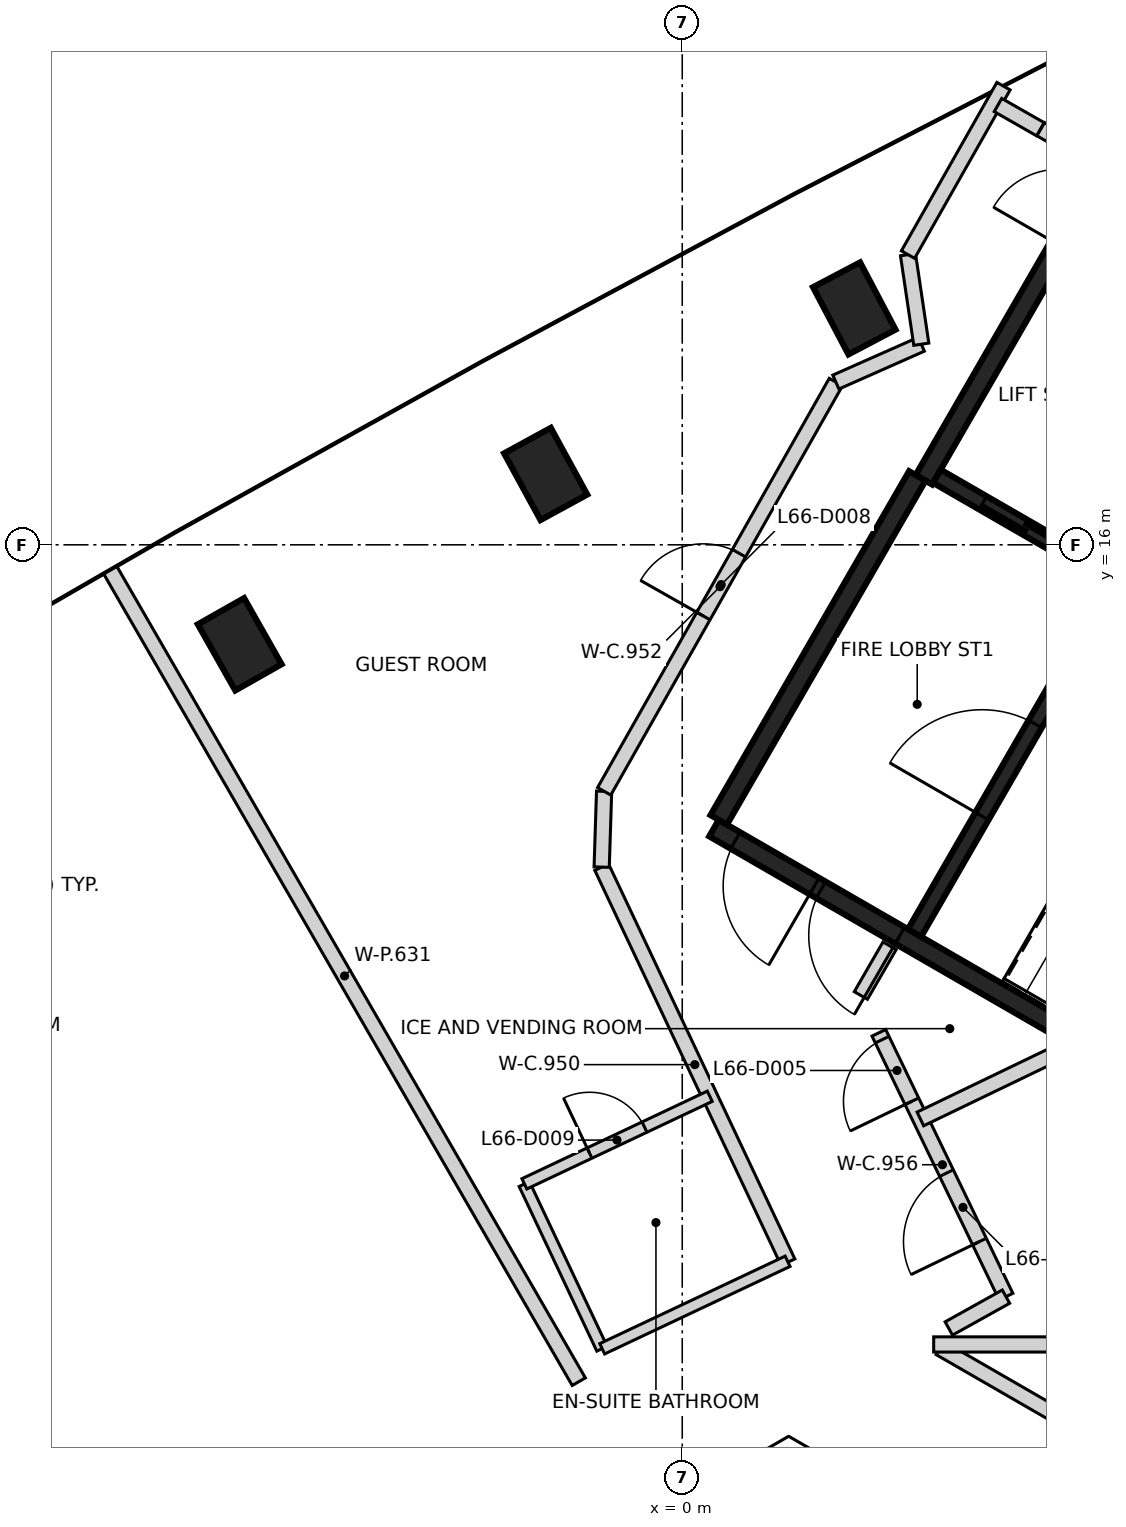
"""IFC4 building model, lengths in metres.
Left out: names, types, materials, properties, quantities, classifications, styles, units other than length and angle.
Written with IfcOpenShell. Run it as: python <this file> out.ifc"""

import sys

from ifc_helpers import new_model, si_unit, direction, frame, frame_2d, origin, origin_2d, place, context, subcontext, project, spatial, rectangle, extrude, element, fill, save


model = new_model("IFC4")
c1 = context("Model", 3, precision=1e-05, world=origin(), true_north=direction((0.0, 1.0)))
c2 = subcontext(c1, "Body", "Model", "MODEL_VIEW")
j1 = project(units=[si_unit("LENGTHUNIT", "METRE"), si_unit("PLANEANGLEUNIT", "RADIAN")], contexts=[c1])
p1 = place(None, origin())
s1 = spatial("IfcSite", under=j1, at=p1, CompositionType="ELEMENT")
p2 = place(p1, origin())
s2 = spatial("IfcBuilding", under=s1, at=p2, CompositionType="ELEMENT")
p3 = place(p2, frame((0.0, 0.0, 262.2)))
s3 = spatial("IfcBuildingStorey", under=s2, at=p3, CompositionType="ELEMENT", Elevation=262.2)
for number, where, z_axis, x_axis in (
    (1, (2.263, 19.11, -0.35), (0.0, 0.0, 1.0), (-0.466, 0.885, 0.0)),
    (2, (-1.797, 16.932, -0.35), (0.0, 0.0, 1.0), (-0.479, 0.878, 0.0)),
    (3, (-5.822, 14.691, -0.35), (0.0, 0.0, 1.0), (-0.493, 0.87, 0.0)),
):
    element("IfcColumn", number, at=place(p3, frame(where, z_axis=z_axis, x_axis=x_axis)), inside=s3, PredefinedType="COLUMN", context=c2, shape_type="SweptSolid", body=[
        extrude(rectangle(XDim=1.0, YDim=0.7, at=origin_2d()), origin(), (0.0, 0.0, 1.0), 3.6),
    ])
p4 = place(p3, frame((10.42, 6.498, 0.0), z_axis=(0.0, 0.0, 1.0), x_axis=(-0.866021906294, 0.500006057782, 0.0)))
e4 = element("IfcWall", 4, at=p4, inside=s3, PredefinedType="SHEAR", context=c2, shape_type="SweptSolid", body=[
    extrude(rectangle(XDim=11.55, YDim=0.25, at=frame_2d((5.775, 0.0))), origin(), (0.0, 0.0, 1.0), 3.25),
])
p5 = place(p4, frame((10.025, 0.0, 0.0)))
e5 = element("IfcOpeningElement", 5, at=p5, cuts=e4, PredefinedType="OPENING", context=c2, shape_type="SweptSolid", body=[
    extrude(rectangle(XDim=1.2, YDim=2.1, at=frame_2d((0.6, 1.05))), frame((0.0, 0.135, 0.0), z_axis=(0.0, -1.0, 0.0), x_axis=(1.0, 0.0, 0.0)), (0.0, 0.0, 1.0), 0.27),
])
p6 = place(p4, frame((8.725, 0.0, 0.0)))
e6 = element("IfcOpeningElement", 6, at=p6, cuts=e4, PredefinedType="OPENING", context=c2, shape_type="SweptSolid", body=[
    extrude(rectangle(XDim=1.2, YDim=2.1, at=frame_2d((0.6, 1.05))), frame((0.0, 0.135, 0.0), z_axis=(0.0, -1.0, 0.0), x_axis=(1.0, 0.0, 0.0)), (0.0, 0.0, 1.0), 0.27),
])
p7 = place(p3, frame((3.179, 16.856, 0.0), z_axis=(0.0, 0.0, 1.0), x_axis=(0.500001955336, 0.866024274868, 0.0)))
e7 = element("IfcWall", 7, at=p7, inside=s3, PredefinedType="SHEAR", context=c2, shape_type="SweptSolid", body=[
    extrude(rectangle(XDim=6.125, YDim=0.25, at=frame_2d((3.062, 0.0))), origin(), (0.0, 0.0, 1.0), 3.25),
])
p8 = place(p7, frame((3.563, 0.0, 0.0)))
e8 = element("IfcOpeningElement", 8, at=p8, cuts=e7, PredefinedType="OPENING", context=c2, shape_type="SweptSolid", body=[
    extrude(rectangle(XDim=1.0, YDim=2.1, at=frame_2d((0.5, 1.05))), frame((0.0, 0.135, 0.0), z_axis=(0.0, -1.0, 0.0), x_axis=(1.0, 0.0, 0.0)), (0.0, 0.0, 1.0), 0.27),
])
p9 = place(p3, frame((0.48, 12.381, 0.0), z_axis=(0.0, 0.0, 1.0), x_axis=(0.49999885962, 0.866026062182, 0.0)))
e9 = element("IfcWall", 9, at=p9, inside=s3, PredefinedType="SHEAR", context=c2, shape_type="SweptSolid", body=[
    extrude(rectangle(XDim=5.225, YDim=0.25, at=frame_2d((2.612, 0.0))), origin(), (0.0, 0.0, 1.0), 3.25),
])
p10 = place(p3, frame((3.057, 10.895, 0.0), z_axis=(0.0, 0.0, 1.0), x_axis=(0.500027839223, 0.866009330205, 0.0)))
e10 = element("IfcWall", 10, at=p10, inside=s3, PredefinedType="SHEAR", context=c2, shape_type="SweptSolid", body=[
    extrude(rectangle(XDim=5.098, YDim=0.2, at=frame_2d((2.549, 0.0))), origin(), (0.0, 0.0, 1.0), 3.25),
])
p11 = place(p10, frame((1.774, 0.0, 0.0)))
e11 = element("IfcOpeningElement", 11, at=p11, cuts=e10, PredefinedType="OPENING", context=c2, shape_type="SweptSolid", body=[
    extrude(rectangle(XDim=1.4, YDim=2.1, at=frame_2d((0.7, 1.05))), frame((0.0, 0.11, 0.0), z_axis=(0.0, -1.0, 0.0), x_axis=(1.0, 0.0, 0.0)), (0.0, 0.0, 1.0), 0.22),
])
p12 = place(p3, frame((5.646, 15.576, 0.0), z_axis=(0.0, 0.0, 1.0), x_axis=(-0.866018407898, 0.500012117035, 0.0)))
e12 = element("IfcWall", 12, at=p12, inside=s3, PredefinedType="SHEAR", context=c2, shape_type="SweptSolid", body=[
    extrude(rectangle(XDim=2.651, YDim=0.2, at=frame_2d((1.325, 0.0))), origin(), (0.0, 0.0, 1.0), 3.25),
])
p13 = place(p12, frame((0.652, 0.0, 0.0)))
e13 = element("IfcOpeningElement", 13, at=p13, cuts=e12, PredefinedType="OPENING", context=c2, shape_type="SweptSolid", body=[
    extrude(rectangle(XDim=1.3, YDim=2.1, at=frame_2d((0.65, 1.05))), frame((0.0, 0.11, 0.0), z_axis=(0.0, -1.0, 0.0), x_axis=(1.0, 0.0, 0.0)), (0.0, 0.0, 1.0), 0.22),
])
p14 = place(p3, frame((-1.06, 11.76, 0.0), z_axis=(0.0, 0.0, 1.0), x_axis=(0.426549824954, -0.904464066081, 0.0)))
e14 = element("IfcWall", 14, at=p14, inside=s3, PredefinedType="PARTITIONING", context=c2, shape_type="SweptSolid", body=[
    extrude(rectangle(XDim=5.747, YDim=0.2, at=frame_2d((2.873, 0.0))), origin(), (0.0, 0.0, 1.0), 3.25),
])
p15 = place(p3, frame((-1.06, 11.76, 0.0), z_axis=(0.0, 0.0, 1.0), x_axis=(0.032059906789, 0.999485949064, 0.0)))
e15 = element("IfcWall", 15, at=p15, inside=s3, PredefinedType="PARTITIONING", context=c2, shape_type="SweptSolid", body=[
    extrude(rectangle(XDim=0.998, YDim=0.2, at=frame_2d((0.499, 0.0))), origin(), (0.0, 0.0, 1.0), 3.25),
])
p16 = place(p3, frame((-1.027, 12.757, 0.0), z_axis=(0.0, 0.0, 1.0), x_axis=(0.492663063759, 0.870220147783, 0.0)))
e16 = element("IfcWall", 16, at=p16, inside=s3, PredefinedType="PARTITIONING", context=c2, shape_type="SweptSolid", body=[
    extrude(rectangle(XDim=6.187, YDim=0.2, at=frame_2d((3.094, 0.0))), origin(), (0.0, 0.0, 1.0), 3.25),
])
p17 = place(p16, frame((2.65, 0.0, 0.0)))
e17 = element("IfcOpeningElement", 17, at=p17, cuts=e16, PredefinedType="OPENING", context=c2, shape_type="SweptSolid", body=[
    extrude(rectangle(XDim=0.95, YDim=2.1, at=frame_2d((0.475, 1.05))), frame((0.0, 0.11, 0.0), z_axis=(0.0, -1.0, 0.0), x_axis=(1.0, 0.0, 0.0)), (0.0, 0.0, 1.0), 0.22),
])
p18 = place(p3, frame((2.021, 18.141, 0.0), z_axis=(0.0, 0.0, 1.0), x_axis=(0.914343087003, 0.404940389748, 0.0)))
e18 = element("IfcWall", 18, at=p18, inside=s3, PredefinedType="PARTITIONING", context=c2, shape_type="SweptSolid", body=[
    extrude(rectangle(XDim=1.229, YDim=0.2, at=frame_2d((0.615, 0.0))), origin(), (0.0, 0.0, 1.0), 3.25),
])
p19 = place(p3, frame((2.35, 10.071, 0.0), z_axis=(0.0, 0.0, 1.0), x_axis=(0.500309905322, 0.865846405916, 0.0)))
e19 = element("IfcWall", 19, at=p19, inside=s3, PredefinedType="PARTITIONING", context=c2, shape_type="SweptSolid", body=[
    extrude(rectangle(XDim=0.755, YDim=0.2, at=frame_2d((0.378, 0.0))), origin(), (0.0, 0.0, 1.0), 3.25),
])
p20 = place(p3, frame((4.26, 6.109, 0.0), z_axis=(0.0, 0.0, 1.0), x_axis=(-0.434189007872, 0.900821794498, 0.0)))
e20 = element("IfcWall", 20, at=p20, inside=s3, PredefinedType="PARTITIONING", context=c2, shape_type="SweptSolid", body=[
    extrude(rectangle(XDim=3.853, YDim=0.2, at=frame_2d((1.926, 0.0))), origin(), (0.0, 0.0, 1.0), 3.25),
])
p21 = place(p20, frame((2.853, 0.0, 0.0)))
e21 = element("IfcOpeningElement", 21, at=p21, cuts=e20, PredefinedType="OPENING", context=c2, shape_type="SweptSolid", body=[
    extrude(rectangle(XDim=0.9, YDim=2.1, at=frame_2d((0.45, 1.05))), frame((0.0, 0.11, 0.0), z_axis=(0.0, -1.0, 0.0), x_axis=(1.0, 0.0, 0.0)), (0.0, 0.0, 1.0), 0.22),
])
p22 = place(p20, frame((0.804, 0.0, 0.0)))
e22 = element("IfcOpeningElement", 22, at=p22, cuts=e20, PredefinedType="OPENING", context=c2, shape_type="SweptSolid", body=[
    extrude(rectangle(XDim=1.0, YDim=2.1, at=frame_2d((0.5, 1.05))), frame((0.0, 0.11, 0.0), z_axis=(0.0, -1.0, 0.0), x_axis=(1.0, 0.0, 0.0)), (0.0, 0.0, 1.0), 0.22),
])
p23 = place(p3, frame((2.97, 19.817, 0.0), z_axis=(0.0, 0.0, 1.0), x_axis=(0.146986994932, -0.989138424752, 0.0)))
e23 = element("IfcWall", 23, at=p23, inside=s3, PredefinedType="PARTITIONING", context=c2, shape_type="SweptSolid", body=[
    extrude(rectangle(XDim=1.191, YDim=0.2, at=frame_2d((0.595, 0.0))), origin(), (0.0, 0.0, 1.0), 2.35),
])
p24 = place(p3, frame((2.97, 19.818, 0.0), z_axis=(0.0, 0.0, 1.0), x_axis=(0.493215654548, 0.86990707441, 0.0)))
e24 = element("IfcWall", 24, at=p24, inside=s3, PredefinedType="PARTITIONING", context=c2, shape_type="SweptSolid", body=[
    extrude(rectangle(XDim=2.548, YDim=0.2, at=frame_2d((1.274, 0.0))), origin(), (0.0, 0.0, 1.0), 3.25),
])
p25 = place(p3, frame((3.39, 5.433, 0.0), z_axis=(0.0, 0.0, 1.0), x_axis=(0.866117799835, -0.499839931186, 0.0)))
e25 = element("IfcWall", 25, at=p25, inside=s3, PredefinedType="PARTITIONING", context=c2, shape_type="SweptSolid", body=[
    extrude(rectangle(XDim=1.859, YDim=0.2, at=frame_2d((0.929, 0.0))), origin(), (0.0, 0.0, 1.0), 3.25),
])
p26 = place(p3, frame((3.507, 5.69, 0.0), z_axis=(0.0, 0.0, 1.0), x_axis=(0.873567976284, 0.486702158215, 0.0)))
e26 = element("IfcWall", 26, at=p26, inside=s3, PredefinedType="PARTITIONING", context=c2, shape_type="SweptSolid", body=[
    extrude(rectangle(XDim=0.861, YDim=0.2, at=frame_2d((0.43, 0.0))), origin(), (0.0, 0.0, 1.0), 3.25),
])
p27 = place(p3, frame((4.154, 21.786, 0.0), z_axis=(0.0, 0.0, 1.0), x_axis=(0.868196374619, -0.496220772539, 0.0)))
e27 = element("IfcWall", 27, at=p27, inside=s3, PredefinedType="PARTITIONING", context=c2, shape_type="SweptSolid", body=[
    extrude(rectangle(XDim=0.643, YDim=0.2, at=frame_2d((0.321, 0.0))), origin(), (0.0, 0.0, 1.0), 3.25),
])
p28 = place(p3, frame((4.716, 21.468, 0.0), z_axis=(0.0, 0.0, 1.0), x_axis=(0.865912682783, -0.500195187698, 0.0)))
e28 = element("IfcWall", 28, at=p28, inside=s3, PredefinedType="PARTITIONING", context=c2, shape_type="SweptSolid", body=[
    extrude(rectangle(XDim=0.79, YDim=0.2, at=frame_2d((0.395, 0.0))), origin(), (0.0, 0.0, 1.0), 3.25),
])
p29 = place(p3, frame((-7.524, 15.666, 0.0), z_axis=(0.0, 0.0, 1.0), x_axis=(0.499979611936, -0.866037174519, 0.0)))
e29 = element("IfcWall", 29, at=p29, inside=s3, PredefinedType="PARTITIONING", context=c2, shape_type="SweptSolid", body=[
    extrude(rectangle(XDim=12.327, YDim=0.2, at=frame_2d((6.164, 0.0))), origin(), (0.0, 0.0, 1.0), 2.35),
])
p30 = place(p3, frame((3.133, 8.447, 0.0), z_axis=(0.0, 0.0, 1.0), x_axis=(0.900981876458, 0.433856725538, 0.0)))
e30 = element("IfcWall", 30, at=p30, inside=s3, PredefinedType="PARTITIONING", context=c2, shape_type="SweptSolid", body=[
    extrude(rectangle(XDim=2.143, YDim=0.2, at=frame_2d((1.071, 0.0))), origin(), (0.0, 0.0, 1.0), 3.25),
])
p31 = place(p3, frame((3.308, 5.48, 0.0), z_axis=(0.0, 0.0, 1.0), x_axis=(1.0, 0.0, 0.0)))
e31 = element("IfcWall", 31, at=p31, inside=s3, PredefinedType="PARTITIONING", context=c2, shape_type="SweptSolid", body=[
    extrude(rectangle(XDim=13.971, YDim=0.2, at=frame_2d((6.986, 0.0))), origin(), (0.0, 0.0, 1.0), 2.35),
])
p32 = place(p3, frame((-2.078, 7.59, 0.0), z_axis=(0.0, 0.0, 1.0), x_axis=(0.426709924428, -0.904388545037, 0.0)))
e32 = element("IfcWall", 32, at=p32, inside=s3, PredefinedType="PARTITIONING", context=c2, shape_type="SweptSolid", body=[
    extrude(rectangle(XDim=2.395, YDim=0.15, at=frame_2d((1.198, 0.0))), origin(), (0.0, 0.0, 1.0), 3.25),
])
p33 = place(p3, frame((-2.077, 7.593, 0.0), z_axis=(0.0, 0.0, 1.0), x_axis=(0.904196218291, 0.427117312724, 0.0)))
e33 = element("IfcWall", 33, at=p33, inside=s3, PredefinedType="PARTITIONING", context=c2, shape_type="SweptSolid", body=[
    extrude(rectangle(XDim=2.697, YDim=0.15, at=frame_2d((1.349, 0.0))), origin(), (0.0, 0.0, 1.0), 3.25),
])
p34 = place(p33, frame((0.948, 0.0, 0.0)))
e34 = element("IfcOpeningElement", 34, at=p34, cuts=e33, PredefinedType="OPENING", context=c2, shape_type="SweptSolid", body=[
    extrude(rectangle(XDim=0.8, YDim=2.1, at=frame_2d((0.4, 1.05))), frame((0.0, 0.085, 0.0), z_axis=(0.0, -1.0, 0.0), x_axis=(1.0, 0.0, 0.0)), (0.0, 0.0, 1.0), 0.17),
])
p35 = place(p3, frame((-1.053, 5.423, 0.0), z_axis=(0.0, 0.0, 1.0), x_axis=(0.904370950432, 0.426747213247, 0.0)))
e35 = element("IfcWall", 35, at=p35, inside=s3, PredefinedType="PARTITIONING", context=c2, shape_type="SweptSolid", body=[
    extrude(rectangle(XDim=2.697, YDim=0.15, at=frame_2d((1.348, 0.0))), origin(), (0.0, 0.0, 1.0), 3.25),
])
p36 = place(p13, origin())
e36 = element("IfcDoor", 36, at=p36, inside=s3, OperationType="SLIDING_TO_LEFT", PredefinedType="DOOR", context=c2, shape_type="SweptSolid", body=[
    extrude(rectangle(XDim=1.3, YDim=2.1, at=frame_2d((0.65, 1.05))), frame((0.0, 0.025, 0.0), z_axis=(0.0, -1.0, 0.0), x_axis=(1.0, 0.0, 0.0)), (0.0, 0.0, 1.0), 0.05),
])
fill(e13, e36)
p37 = place(p5, origin())
e37 = element("IfcDoor", 37, at=p37, inside=s3, OperationType="SINGLE_SWING_LEFT", PredefinedType="DOOR", context=c2, shape_type="SweptSolid", body=[
    extrude(rectangle(XDim=1.2, YDim=2.1, at=frame_2d((0.6, 1.05))), frame((0.0, 0.025, 0.0), z_axis=(0.0, -1.0, 0.0), x_axis=(1.0, 0.0, 0.0)), (0.0, 0.0, 1.0), 0.05),
])
fill(e5, e37)
p38 = place(p6, origin())
e38 = element("IfcDoor", 38, at=p38, inside=s3, OperationType="SINGLE_SWING_RIGHT", PredefinedType="DOOR", context=c2, shape_type="SweptSolid", body=[
    extrude(rectangle(XDim=1.2, YDim=2.1, at=frame_2d((0.6, 1.05))), frame((0.0, 0.025, 0.0), z_axis=(0.0, -1.0, 0.0), x_axis=(1.0, 0.0, 0.0)), (0.0, 0.0, 1.0), 0.05),
])
fill(e6, e38)
p39 = place(p11, origin())
e39 = element("IfcDoor", 39, at=p39, inside=s3, OperationType="SINGLE_SWING_LEFT", PredefinedType="DOOR", context=c2, shape_type="SweptSolid", body=[
    extrude(rectangle(XDim=1.4, YDim=2.1, at=frame_2d((0.7, 1.05))), frame((0.0, 0.025, 0.0), z_axis=(0.0, -1.0, 0.0), x_axis=(1.0, 0.0, 0.0)), (0.0, 0.0, 1.0), 0.05),
])
fill(e11, e39)
p40 = place(p21, origin())
e40 = element("IfcDoor", 40, at=p40, inside=s3, OperationType="SINGLE_SWING_LEFT", PredefinedType="DOOR", context=c2, shape_type="SweptSolid", body=[
    extrude(rectangle(XDim=0.9, YDim=2.1, at=frame_2d((0.45, 1.05))), frame((0.0, 0.025, 0.0), z_axis=(0.0, -1.0, 0.0), x_axis=(1.0, 0.0, 0.0)), (0.0, 0.0, 1.0), 0.05),
])
fill(e21, e40)
p41 = place(p22, origin())
e41 = element("IfcDoor", 41, at=p41, inside=s3, OperationType="SINGLE_SWING_LEFT", PredefinedType="DOOR", context=c2, shape_type="SweptSolid", body=[
    extrude(rectangle(XDim=1.0, YDim=2.1, at=frame_2d((0.5, 1.05))), frame((0.0, 0.025, 0.0), z_axis=(0.0, -1.0, 0.0), x_axis=(1.0, 0.0, 0.0)), (0.0, 0.0, 1.0), 0.05),
])
fill(e22, e41)
p42 = place(p17, origin())
e42 = element("IfcDoor", 42, at=p42, inside=s3, OperationType="SINGLE_SWING_LEFT", PredefinedType="DOOR", context=c2, shape_type="SweptSolid", body=[
    extrude(rectangle(XDim=0.95, YDim=2.1, at=frame_2d((0.475, 1.05))), frame((0.0, 0.025, 0.0), z_axis=(0.0, -1.0, 0.0), x_axis=(1.0, 0.0, 0.0)), (0.0, 0.0, 1.0), 0.05),
])
fill(e17, e42)
p43 = place(p34, origin())
e43 = element("IfcDoor", 43, at=p43, inside=s3, OperationType="SINGLE_SWING_LEFT", PredefinedType="DOOR", context=c2, shape_type="SweptSolid", body=[
    extrude(rectangle(XDim=0.8, YDim=2.1, at=frame_2d((0.4, 1.05))), frame((0.0, 0.025, 0.0), z_axis=(0.0, -1.0, 0.0), x_axis=(1.0, 0.0, 0.0)), (0.0, 0.0, 1.0), 0.05),
])
fill(e34, e43)
save(model, sys.argv[1])
